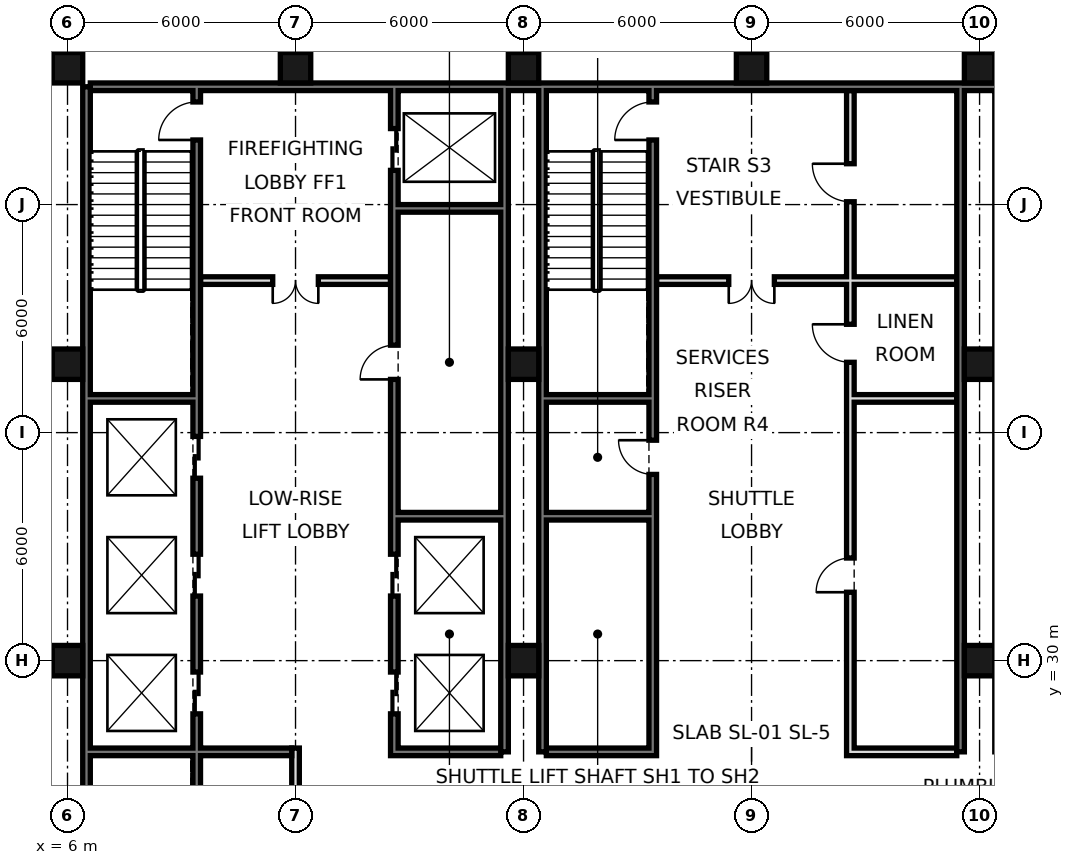
"""IFC4 building model, lengths in metres.
Left out: names, types, materials, properties, quantities, classifications, styles, units other than length and angle.
Written with IfcOpenShell. Run it as: python <this file> out.ifc"""

import sys

from ifc_helpers import new_model, si_unit, direction, frame, frame_2d, origin, origin_2d, place, context, subcontext, project, spatial, rectangle, hollow_rectangle, extrude, element, fill, save


model = new_model("IFC4")
c1 = context("Model", 3, precision=1e-05, world=origin(), true_north=direction((0.0, 1.0)))
c2 = subcontext(c1, "Body", "Model", "MODEL_VIEW")
j1 = project(units=[si_unit("LENGTHUNIT", "METRE"), si_unit("PLANEANGLEUNIT", "RADIAN")], contexts=[c1])
p1 = place(None, origin())
s1 = spatial("IfcSite", under=j1, at=p1, CompositionType="ELEMENT")
p2 = place(p1, origin())
s2 = spatial("IfcBuilding", under=s1, at=p2, CompositionType="ELEMENT")
p3 = place(p2, frame((0.0, 0.0, 39.6)))
s3 = spatial("IfcBuildingStorey", under=s2, at=p3, CompositionType="ELEMENT", Elevation=39.6)
for number, where, z_axis, x_axis in (
    (1, (6.0, 30.0, 0.0), (0.0, 0.0, 1.0), (1.0, 0.0, 0.0)),
    (2, (6.0, 37.8, 0.0), (0.0, 0.0, 1.0), (1.0, 0.0, 0.0)),
    (3, (6.0, 45.6, 0.0), (0.0, 0.0, 1.0), (1.0, 0.0, 0.0)),
    (4, (12.0, 45.6, 0.0), (0.0, 0.0, 1.0), (1.0, 0.0, 0.0)),
    (5, (18.0, 30.0, 0.0), (0.0, 0.0, 1.0), (1.0, 0.0, 0.0)),
    (6, (18.0, 37.8, 0.0), (0.0, 0.0, 1.0), (1.0, 0.0, 0.0)),
    (7, (18.0, 45.6, 0.0), (0.0, 0.0, 1.0), (1.0, 0.0, 0.0)),
    (8, (24.0, 45.6, 0.0), (0.0, 0.0, 1.0), (1.0, 0.0, 0.0)),
    (9, (30.0, 30.0, 0.0), (0.0, 0.0, 1.0), (1.0, 0.0, 0.0)),
    (10, (30.0, 37.8, 0.0), (0.0, 0.0, 1.0), (1.0, 0.0, 0.0)),
    (11, (30.0, 45.6, 0.0), (0.0, 0.0, 1.0), (1.0, 0.0, 0.0)),
):
    element("IfcColumn", number, at=place(p3, frame(where, z_axis=z_axis, x_axis=x_axis)), inside=s3, PredefinedType="COLUMN", context=c2, shape_type="SweptSolid", body=[
        extrude(hollow_rectangle(XDim=0.8, YDim=0.8, WallThickness=0.07, at=origin_2d()), origin(), (0.0, 0.0, 1.0), 4.8),
    ])
p4 = place(p3, frame((6.5, 21.6, 0.0), z_axis=(0.0, 0.0, 1.0), x_axis=(0.0, 1.0, 0.0)))
e12 = element("IfcWall", 12, at=p4, inside=s3, PredefinedType="SOLIDWALL", context=c2, shape_type="SweptSolid", body=[
    extrude(rectangle(XDim=23.5, YDim=0.2, at=frame_2d((11.75, 0.0))), origin(), (0.0, 0.0, 1.0), 4.5),
])
p5 = place(p3, frame((6.6, 45.1, 0.0), z_axis=(0.0, 0.0, 1.0), x_axis=(1.0, 0.0, 0.0)))
e13 = element("IfcWall", 13, at=p5, inside=s3, PredefinedType="SOLIDWALL", context=c2, shape_type="SweptSolid", body=[
    extrude(rectangle(XDim=34.8, YDim=0.2, at=frame_2d((17.4, 0.0))), origin(), (0.0, 0.0, 1.0), 4.5),
])
for number, where, z_axis, x_axis in (
    (14, (17.5, 27.6, 0.0), (0.0, 0.0, 1.0), (0.0, 1.0, 0.0)),
    (15, (18.5, 27.6, 0.0), (0.0, 0.0, 1.0), (0.0, 1.0, 0.0)),
    (16, (29.5, 27.6, 0.0), (0.0, 0.0, 1.0), (0.0, 1.0, 0.0)),
):
    element("IfcWall", number, at=place(p3, frame(where, z_axis=z_axis, x_axis=x_axis)), inside=s3, PredefinedType="SOLIDWALL", context=c2, shape_type="SweptSolid", body=[
        extrude(rectangle(XDim=17.5, YDim=0.2, at=frame_2d((8.75, 0.0))), origin(), (0.0, 0.0, 1.0), 4.5),
    ])
p6 = place(p3, frame((12.0, 21.6, 0.0), z_axis=(0.0, 0.0, 1.0), x_axis=(0.0, 1.0, 0.0)))
e17 = element("IfcWall", 17, at=p6, inside=s3, PredefinedType="PARTITIONING", context=c2, shape_type="SweptSolid", body=[
    extrude(rectangle(XDim=6.1, YDim=0.2, at=frame_2d((3.05, 0.0))), origin(), (0.0, 0.0, 1.0), 4.5),
])
p7 = place(p3, frame((14.6, 27.5, 0.0), z_axis=(0.0, 0.0, 1.0), x_axis=(0.0, 1.0, 0.0)))
e18 = element("IfcWall", 18, at=p7, inside=s3, PredefinedType="SOLIDWALL", context=c2, shape_type="SweptSolid", body=[
    extrude(rectangle(XDim=17.5, YDim=0.2, at=frame_2d((8.75, 0.0))), origin(), (0.0, 0.0, 1.0), 4.5),
])
p8 = place(p7, frame((1.1, 0.0, 0.0)))
e19 = element("IfcOpeningElement", 19, at=p8, cuts=e18, PredefinedType="OPENING", context=c2, shape_type="SweptSolid", body=[
    extrude(rectangle(XDim=1.1, YDim=2.1, at=frame_2d((0.55, 1.05))), frame((0.0, 0.11, 0.0), z_axis=(0.0, -1.0, 0.0), x_axis=(1.0, 0.0, 0.0)), (0.0, 0.0, 1.0), 0.22),
])
p9 = place(p7, frame((4.2, 0.0, 0.0)))
e20 = element("IfcOpeningElement", 20, at=p9, cuts=e18, PredefinedType="OPENING", context=c2, shape_type="SweptSolid", body=[
    extrude(rectangle(XDim=1.1, YDim=2.1, at=frame_2d((0.55, 1.05))), frame((0.0, 0.11, 0.0), z_axis=(0.0, -1.0, 0.0), x_axis=(1.0, 0.0, 0.0)), (0.0, 0.0, 1.0), 0.22),
])
p10 = place(p7, frame((15.4, 0.0, 0.0)))
e21 = element("IfcOpeningElement", 21, at=p10, cuts=e18, PredefinedType="OPENING", context=c2, shape_type="SweptSolid", body=[
    extrude(rectangle(XDim=1.1, YDim=2.1, at=frame_2d((0.55, 1.05))), frame((0.0, 0.11, 0.0), z_axis=(0.0, -1.0, 0.0), x_axis=(1.0, 0.0, 0.0)), (0.0, 0.0, 1.0), 0.22),
])
p11 = place(p7, frame((9.9, 0.0, 0.0)))
e22 = element("IfcOpeningElement", 22, at=p11, cuts=e18, PredefinedType="OPENING", context=c2, shape_type="SweptSolid", body=[
    extrude(rectangle(XDim=0.9, YDim=2.1, at=frame_2d((0.45, 1.05))), frame((0.0, 0.11, 0.0), z_axis=(0.0, -1.0, 0.0), x_axis=(1.0, 0.0, 0.0)), (0.0, 0.0, 1.0), 0.22),
])
p12 = place(p3, frame((21.4, 27.5, 0.0), z_axis=(0.0, 0.0, 1.0), x_axis=(0.0, 1.0, 0.0)))
e23 = element("IfcWall", 23, at=p12, inside=s3, PredefinedType="SOLIDWALL", context=c2, shape_type="SweptSolid", body=[
    extrude(rectangle(XDim=17.5, YDim=0.2, at=frame_2d((8.75, 0.0))), origin(), (0.0, 0.0, 1.0), 4.5),
])
p13 = place(p12, frame((16.2, 0.0, 0.0)))
e24 = element("IfcOpeningElement", 24, at=p13, cuts=e23, PredefinedType="OPENING", context=c2, shape_type="SweptSolid", body=[
    extrude(rectangle(XDim=1.0, YDim=2.1, at=frame_2d((0.5, 1.05))), frame((0.0, 0.11, 0.0), z_axis=(0.0, -1.0, 0.0), x_axis=(1.0, 0.0, 0.0)), (0.0, 0.0, 1.0), 0.22),
])
p14 = place(p12, frame((7.4, 0.0, 0.0)))
e25 = element("IfcOpeningElement", 25, at=p14, cuts=e23, PredefinedType="OPENING", context=c2, shape_type="SweptSolid", body=[
    extrude(rectangle(XDim=0.9, YDim=2.1, at=frame_2d((0.45, 1.05))), frame((0.0, 0.11, 0.0), z_axis=(0.0, -1.0, 0.0), x_axis=(1.0, 0.0, 0.0)), (0.0, 0.0, 1.0), 0.22),
])
p15 = place(p3, frame((26.6, 27.5, 0.0), z_axis=(0.0, 0.0, 1.0), x_axis=(0.0, 1.0, 0.0)))
e26 = element("IfcWall", 26, at=p15, inside=s3, PredefinedType="SOLIDWALL", context=c2, shape_type="SweptSolid", body=[
    extrude(rectangle(XDim=17.5, YDim=0.2, at=frame_2d((8.75, 0.0))), origin(), (0.0, 0.0, 1.0), 4.5),
])
p16 = place(p15, frame((4.3, 0.0, 0.0)))
e27 = element("IfcOpeningElement", 27, at=p16, cuts=e26, PredefinedType="OPENING", context=c2, shape_type="SweptSolid", body=[
    extrude(rectangle(XDim=0.9, YDim=2.1, at=frame_2d((0.45, 1.05))), frame((0.0, 0.11, 0.0), z_axis=(0.0, -1.0, 0.0), x_axis=(1.0, 0.0, 0.0)), (0.0, 0.0, 1.0), 0.22),
])
p17 = place(p15, frame((10.35, 0.0, 0.0)))
e28 = element("IfcOpeningElement", 28, at=p17, cuts=e26, PredefinedType="OPENING", context=c2, shape_type="SweptSolid", body=[
    extrude(rectangle(XDim=1.0, YDim=2.1, at=frame_2d((0.5, 1.05))), frame((0.0, 0.11, 0.0), z_axis=(0.0, -1.0, 0.0), x_axis=(1.0, 0.0, 0.0)), (0.0, 0.0, 1.0), 0.22),
])
p18 = place(p15, frame((14.575, 0.0, 0.0)))
e29 = element("IfcOpeningElement", 29, at=p18, cuts=e26, PredefinedType="OPENING", context=c2, shape_type="SweptSolid", body=[
    extrude(rectangle(XDim=1.0, YDim=2.1, at=frame_2d((0.5, 1.05))), frame((0.0, 0.11, 0.0), z_axis=(0.0, -1.0, 0.0), x_axis=(1.0, 0.0, 0.0)), (0.0, 0.0, 1.0), 0.22),
])
p19 = place(p3, frame((9.4, 21.6, 0.0), z_axis=(0.0, 0.0, 1.0), x_axis=(0.0, 1.0, 0.0)))
e30 = element("IfcWall", 30, at=p19, inside=s3, PredefinedType="SOLIDWALL", context=c2, shape_type="SweptSolid", body=[
    extrude(rectangle(XDim=23.4, YDim=0.2, at=frame_2d((11.7, 0.0))), origin(), (0.0, 0.0, 1.0), 4.5),
])
p20 = place(p19, frame((7.0, 0.0, 0.0)))
e31 = element("IfcOpeningElement", 31, at=p20, cuts=e30, PredefinedType="OPENING", context=c2, shape_type="SweptSolid", body=[
    extrude(rectangle(XDim=1.1, YDim=2.1, at=frame_2d((0.55, 1.05))), frame((0.0, 0.11, 0.0), z_axis=(0.0, -1.0, 0.0), x_axis=(1.0, 0.0, 0.0)), (0.0, 0.0, 1.0), 0.22),
])
p21 = place(p19, frame((10.1, 0.0, 0.0)))
e32 = element("IfcOpeningElement", 32, at=p21, cuts=e30, PredefinedType="OPENING", context=c2, shape_type="SweptSolid", body=[
    extrude(rectangle(XDim=1.1, YDim=2.1, at=frame_2d((0.55, 1.05))), frame((0.0, 0.11, 0.0), z_axis=(0.0, -1.0, 0.0), x_axis=(1.0, 0.0, 0.0)), (0.0, 0.0, 1.0), 0.22),
])
p22 = place(p19, frame((13.2, 0.0, 0.0)))
e33 = element("IfcOpeningElement", 33, at=p22, cuts=e30, PredefinedType="OPENING", context=c2, shape_type="SweptSolid", body=[
    extrude(rectangle(XDim=1.1, YDim=2.1, at=frame_2d((0.55, 1.05))), frame((0.0, 0.11, 0.0), z_axis=(0.0, -1.0, 0.0), x_axis=(1.0, 0.0, 0.0)), (0.0, 0.0, 1.0), 0.22),
])
p23 = place(p19, frame((22.1, 0.0, 0.0)))
e34 = element("IfcOpeningElement", 34, at=p23, cuts=e30, PredefinedType="OPENING", context=c2, shape_type="SweptSolid", body=[
    extrude(rectangle(XDim=1.0, YDim=2.1, at=frame_2d((0.5, 1.05))), frame((0.0, 0.11, 0.0), z_axis=(0.0, -1.0, 0.0), x_axis=(1.0, 0.0, 0.0)), (0.0, 0.0, 1.0), 0.22),
])
p24 = place(p19, frame((0.175, 0.0, 0.0)))
e35 = element("IfcOpeningElement", 35, at=p24, cuts=e30, PredefinedType="OPENING", context=c2, shape_type="SweptSolid", body=[
    extrude(rectangle(XDim=0.9, YDim=2.1, at=frame_2d((0.45, 1.05))), frame((0.0, 0.11, 0.0), z_axis=(0.0, -1.0, 0.0), x_axis=(1.0, 0.0, 0.0)), (0.0, 0.0, 1.0), 0.22),
])
for number, where, z_axis, x_axis in (
    (36, (14.7, 27.6, 0.0), (0.0, 0.0, 1.0), (1.0, 0.0, 0.0)),
    (37, (18.6, 27.6, 0.0), (0.0, 0.0, 1.0), (1.0, 0.0, 0.0)),
    (38, (26.7, 27.6, 0.0), (0.0, 0.0, 1.0), (1.0, 0.0, 0.0)),
):
    element("IfcWall", number, at=place(p3, frame(where, z_axis=z_axis, x_axis=x_axis)), inside=s3, PredefinedType="SOLIDWALL", context=c2, shape_type="SweptSolid", body=[
        extrude(rectangle(XDim=2.7, YDim=0.2, at=frame_2d((1.35, 0.0))), origin(), (0.0, 0.0, 1.0), 4.5),
    ])
p25 = place(p3, frame((6.6, 27.6, 0.0), z_axis=(0.0, 0.0, 1.0), x_axis=(1.0, 0.0, 0.0)))
e39 = element("IfcWall", 39, at=p25, inside=s3, PredefinedType="SOLIDWALL", context=c2, shape_type="SweptSolid", body=[
    extrude(rectangle(XDim=5.3, YDim=0.2, at=frame_2d((2.65, 0.0))), origin(), (0.0, 0.0, 1.0), 4.5),
])
for number, where, z_axis, x_axis in (
    (40, (14.7, 33.8, 0.0), (0.0, 0.0, 1.0), (1.0, 0.0, 0.0)),
    (41, (18.6, 33.8, 0.0), (0.0, 0.0, 1.0), (1.0, 0.0, 0.0)),
    (42, (18.6, 36.9, 0.0), (0.0, 0.0, 1.0), (1.0, 0.0, 0.0)),
    (43, (26.7, 36.9, 0.0), (0.0, 0.0, 1.0), (1.0, 0.0, 0.0)),
    (44, (6.6, 36.9, 0.0), (0.0, 0.0, 1.0), (1.0, 0.0, 0.0)),
):
    element("IfcWall", number, at=place(p3, frame(where, z_axis=z_axis, x_axis=x_axis)), inside=s3, PredefinedType="SOLIDWALL", context=c2, shape_type="SweptSolid", body=[
        extrude(rectangle(XDim=2.7, YDim=0.2, at=frame_2d((1.35, 0.0))), origin(), (0.0, 0.0, 1.0), 4.5),
    ])
p26 = place(p3, frame((21.5, 40.0, 0.0), z_axis=(0.0, 0.0, 1.0), x_axis=(1.0, 0.0, 0.0)))
e45 = element("IfcWall", 45, at=p26, inside=s3, PredefinedType="PARTITIONING", context=c2, shape_type="SweptSolid", body=[
    extrude(rectangle(XDim=7.9, YDim=0.2, at=frame_2d((3.95, 0.0))), origin(), (0.0, 0.0, 1.0), 4.5),
])
p27 = place(p26, frame((1.9, 0.0, 0.0)))
e46 = element("IfcOpeningElement", 46, at=p27, cuts=e45, PredefinedType="OPENING", context=c2, shape_type="SweptSolid", body=[
    extrude(rectangle(XDim=1.2, YDim=2.1, at=frame_2d((0.6, 1.05))), frame((0.0, 0.11, 0.0), z_axis=(0.0, -1.0, 0.0), x_axis=(1.0, 0.0, 0.0)), (0.0, 0.0, 1.0), 0.22),
])
p28 = place(p3, frame((9.5, 40.0, 0.0), z_axis=(0.0, 0.0, 1.0), x_axis=(1.0, 0.0, 0.0)))
e47 = element("IfcWall", 47, at=p28, inside=s3, PredefinedType="PARTITIONING", context=c2, shape_type="SweptSolid", body=[
    extrude(rectangle(XDim=5.0, YDim=0.2, at=frame_2d((2.5, 0.0))), origin(), (0.0, 0.0, 1.0), 4.5),
])
p29 = place(p28, frame((1.9, 0.0, 0.0)))
e48 = element("IfcOpeningElement", 48, at=p29, cuts=e47, PredefinedType="OPENING", context=c2, shape_type="SweptSolid", body=[
    extrude(rectangle(XDim=1.2, YDim=2.1, at=frame_2d((0.6, 1.05))), frame((0.0, 0.11, 0.0), z_axis=(0.0, -1.0, 0.0), x_axis=(1.0, 0.0, 0.0)), (0.0, 0.0, 1.0), 0.22),
])
p30 = place(p3, frame((14.7, 41.9, 0.0), z_axis=(0.0, 0.0, 1.0), x_axis=(1.0, 0.0, 0.0)))
e49 = element("IfcWall", 49, at=p30, inside=s3, PredefinedType="SOLIDWALL", context=c2, shape_type="SweptSolid", body=[
    extrude(rectangle(XDim=2.7, YDim=0.2, at=frame_2d((1.35, 0.0))), origin(), (0.0, 0.0, 1.0), 4.5),
])
p31 = place(p29, frame((1.2, 0.0, 0.0), z_axis=(0.0, 0.0, 1.0), x_axis=(-1.0, 0.0, 0.0)))
e50 = element("IfcDoor", 50, at=p31, inside=s3, OperationType="DOUBLE_DOOR_SINGLE_SWING", PredefinedType="DOOR", context=c2, shape_type="SweptSolid", body=[
    extrude(rectangle(XDim=1.2, YDim=2.1, at=frame_2d((0.6, 1.05))), frame((0.0, 0.025, 0.0), z_axis=(0.0, -1.0, 0.0), x_axis=(1.0, 0.0, 0.0)), (0.0, 0.0, 1.0), 0.05),
])
fill(e48, e50)
p32 = place(p27, frame((1.2, 0.0, 0.0), z_axis=(0.0, 0.0, 1.0), x_axis=(-1.0, 0.0, 0.0)))
e51 = element("IfcDoor", 51, at=p32, inside=s3, OperationType="DOUBLE_DOOR_SINGLE_SWING", PredefinedType="DOOR", context=c2, shape_type="SweptSolid", body=[
    extrude(rectangle(XDim=1.2, YDim=2.1, at=frame_2d((0.6, 1.05))), frame((0.0, 0.025, 0.0), z_axis=(0.0, -1.0, 0.0), x_axis=(1.0, 0.0, 0.0)), (0.0, 0.0, 1.0), 0.05),
])
fill(e46, e51)
p33 = place(p8, origin())
e52 = element("IfcDoor", 52, at=p33, inside=s3, OperationType="DOUBLE_DOOR_SLIDING", PredefinedType="DOOR", context=c2, shape_type="SweptSolid", body=[
    extrude(rectangle(XDim=1.1, YDim=2.1, at=frame_2d((0.55, 1.05))), frame((0.0, 0.025, 0.0), z_axis=(0.0, -1.0, 0.0), x_axis=(1.0, 0.0, 0.0)), (0.0, 0.0, 1.0), 0.05),
])
fill(e19, e52)
p34 = place(p9, origin())
e53 = element("IfcDoor", 53, at=p34, inside=s3, OperationType="DOUBLE_DOOR_SLIDING", PredefinedType="DOOR", context=c2, shape_type="SweptSolid", body=[
    extrude(rectangle(XDim=1.1, YDim=2.1, at=frame_2d((0.55, 1.05))), frame((0.0, 0.025, 0.0), z_axis=(0.0, -1.0, 0.0), x_axis=(1.0, 0.0, 0.0)), (0.0, 0.0, 1.0), 0.05),
])
fill(e20, e53)
p35 = place(p10, origin())
e54 = element("IfcDoor", 54, at=p35, inside=s3, OperationType="DOUBLE_DOOR_SLIDING", PredefinedType="DOOR", context=c2, shape_type="SweptSolid", body=[
    extrude(rectangle(XDim=1.1, YDim=2.1, at=frame_2d((0.55, 1.05))), frame((0.0, 0.025, 0.0), z_axis=(0.0, -1.0, 0.0), x_axis=(1.0, 0.0, 0.0)), (0.0, 0.0, 1.0), 0.05),
])
fill(e21, e54)
p36 = place(p20, origin())
e55 = element("IfcDoor", 55, at=p36, inside=s3, OperationType="DOUBLE_DOOR_SLIDING", PredefinedType="DOOR", context=c2, shape_type="SweptSolid", body=[
    extrude(rectangle(XDim=1.1, YDim=2.1, at=frame_2d((0.55, 1.05))), frame((0.0, 0.025, 0.0), z_axis=(0.0, -1.0, 0.0), x_axis=(1.0, 0.0, 0.0)), (0.0, 0.0, 1.0), 0.05),
])
fill(e31, e55)
p37 = place(p21, origin())
e56 = element("IfcDoor", 56, at=p37, inside=s3, OperationType="DOUBLE_DOOR_SLIDING", PredefinedType="DOOR", context=c2, shape_type="SweptSolid", body=[
    extrude(rectangle(XDim=1.1, YDim=2.1, at=frame_2d((0.55, 1.05))), frame((0.0, 0.025, 0.0), z_axis=(0.0, -1.0, 0.0), x_axis=(1.0, 0.0, 0.0)), (0.0, 0.0, 1.0), 0.05),
])
fill(e32, e56)
p38 = place(p22, origin())
e57 = element("IfcDoor", 57, at=p38, inside=s3, OperationType="DOUBLE_DOOR_SLIDING", PredefinedType="DOOR", context=c2, shape_type="SweptSolid", body=[
    extrude(rectangle(XDim=1.1, YDim=2.1, at=frame_2d((0.55, 1.05))), frame((0.0, 0.025, 0.0), z_axis=(0.0, -1.0, 0.0), x_axis=(1.0, 0.0, 0.0)), (0.0, 0.0, 1.0), 0.05),
])
fill(e33, e57)
p39 = place(p23, origin())
e58 = element("IfcDoor", 58, at=p39, inside=s3, OperationType="SINGLE_SWING_LEFT", PredefinedType="DOOR", context=c2, shape_type="SweptSolid", body=[
    extrude(rectangle(XDim=1.0, YDim=2.1, at=frame_2d((0.5, 1.05))), frame((0.0, 0.025, 0.0), z_axis=(0.0, -1.0, 0.0), x_axis=(1.0, 0.0, 0.0)), (0.0, 0.0, 1.0), 0.05),
])
fill(e34, e58)
p40 = place(p13, origin())
e59 = element("IfcDoor", 59, at=p40, inside=s3, OperationType="SINGLE_SWING_LEFT", PredefinedType="DOOR", context=c2, shape_type="SweptSolid", body=[
    extrude(rectangle(XDim=1.0, YDim=2.1, at=frame_2d((0.5, 1.05))), frame((0.0, 0.025, 0.0), z_axis=(0.0, -1.0, 0.0), x_axis=(1.0, 0.0, 0.0)), (0.0, 0.0, 1.0), 0.05),
])
fill(e24, e59)
p41 = place(p11, origin())
e60 = element("IfcDoor", 60, at=p41, inside=s3, OperationType="SINGLE_SWING_LEFT", PredefinedType="DOOR", context=c2, shape_type="SweptSolid", body=[
    extrude(rectangle(XDim=0.9, YDim=2.1, at=frame_2d((0.45, 1.05))), frame((0.0, 0.025, 0.0), z_axis=(0.0, -1.0, 0.0), x_axis=(1.0, 0.0, 0.0)), (0.0, 0.0, 1.0), 0.05),
])
fill(e22, e60)
p42 = place(p14, frame((0.9, 0.0, 0.0), z_axis=(0.0, 0.0, 1.0), x_axis=(-1.0, 0.0, 0.0)))
e61 = element("IfcDoor", 61, at=p42, inside=s3, OperationType="SINGLE_SWING_LEFT", PredefinedType="DOOR", context=c2, shape_type="SweptSolid", body=[
    extrude(rectangle(XDim=0.9, YDim=2.1, at=frame_2d((0.45, 1.05))), frame((0.0, 0.025, 0.0), z_axis=(0.0, -1.0, 0.0), x_axis=(1.0, 0.0, 0.0)), (0.0, 0.0, 1.0), 0.05),
])
fill(e25, e61)
p43 = place(p16, origin())
e62 = element("IfcDoor", 62, at=p43, inside=s3, OperationType="SINGLE_SWING_LEFT", PredefinedType="DOOR", context=c2, shape_type="SweptSolid", body=[
    extrude(rectangle(XDim=0.9, YDim=2.1, at=frame_2d((0.45, 1.05))), frame((0.0, 0.025, 0.0), z_axis=(0.0, -1.0, 0.0), x_axis=(1.0, 0.0, 0.0)), (0.0, 0.0, 1.0), 0.05),
])
fill(e27, e62)
p44 = place(p17, frame((1.0, 0.0, 0.0), z_axis=(0.0, 0.0, 1.0), x_axis=(-1.0, 0.0, 0.0)))
e63 = element("IfcDoor", 63, at=p44, inside=s3, OperationType="SINGLE_SWING_LEFT", PredefinedType="DOOR", context=c2, shape_type="SweptSolid", body=[
    extrude(rectangle(XDim=1.0, YDim=2.1, at=frame_2d((0.5, 1.05))), frame((0.0, 0.025, 0.0), z_axis=(0.0, -1.0, 0.0), x_axis=(1.0, 0.0, 0.0)), (0.0, 0.0, 1.0), 0.05),
])
fill(e28, e63)
p45 = place(p18, frame((1.0, 0.0, 0.0), z_axis=(0.0, 0.0, 1.0), x_axis=(-1.0, 0.0, 0.0)))
e64 = element("IfcDoor", 64, at=p45, inside=s3, OperationType="SINGLE_SWING_LEFT", PredefinedType="DOOR", context=c2, shape_type="SweptSolid", body=[
    extrude(rectangle(XDim=1.0, YDim=2.1, at=frame_2d((0.5, 1.05))), frame((0.0, 0.025, 0.0), z_axis=(0.0, -1.0, 0.0), x_axis=(1.0, 0.0, 0.0)), (0.0, 0.0, 1.0), 0.05),
])
fill(e29, e64)
save(model, sys.argv[1])
